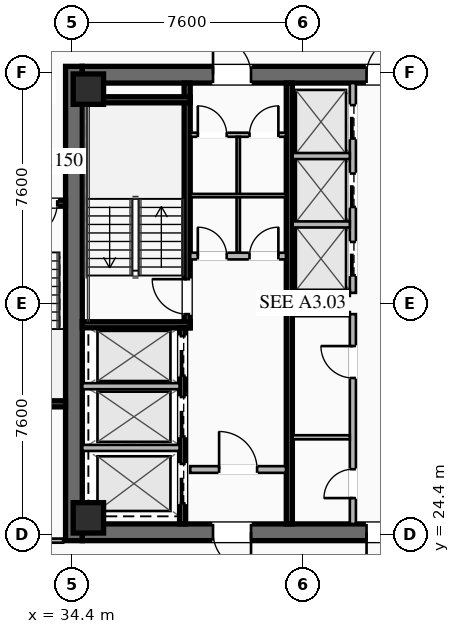
"""IFC4 building model, lengths in metres.
Left out: names, types, materials, properties, quantities, classifications, styles, units other than length and angle.
Written with IfcOpenShell. Run it as: python <this file> out.ifc"""

import sys

from ifc_helpers import new_model, si_unit, direction, frame, frame_2d, origin, origin_2d, place, context, subcontext, project, spatial, rectangle, hollow_rectangle, extrude, element, fill, save


model = new_model("IFC4")
c1 = context("Model", 3, precision=1e-05, world=origin(), true_north=direction((0.0, 1.0)))
c2 = subcontext(c1, "Body", "Model", "MODEL_VIEW")
j1 = project(units=[si_unit("LENGTHUNIT", "METRE"), si_unit("PLANEANGLEUNIT", "RADIAN")], contexts=[c1])
p1 = place(None, origin())
s1 = spatial("IfcSite", under=j1, at=p1, CompositionType="ELEMENT")
p2 = place(p1, origin())
s2 = spatial("IfcBuilding", under=s1, at=p2, CompositionType="ELEMENT")
p3 = place(p2, frame((0.0, 0.0, 146.35)))
s3 = spatial("IfcBuildingStorey", under=s2, at=p3, CompositionType="ELEMENT", Elevation=146.35)
p4 = place(p3, frame((34.475, 24.2, 0.0), z_axis=(0.0, 0.0, 1.0), x_axis=(0.0, 1.0, 0.0)))
e1 = element("IfcWall", 1, at=p4, inside=s3, PredefinedType="SHEAR", context=c2, shape_type="SweptSolid", body=[
    extrude(rectangle(XDim=15.6, YDim=0.55, at=frame_2d((7.8, 0.0))), origin(), (0.0, 0.0, 1.0), 3.55),
])
p5 = place(p3, frame((49.25, 24.475, 0.0), z_axis=(0.0, 0.0, 1.0), x_axis=(-1.0, 0.0, 0.0)))
e2 = element("IfcWall", 2, at=p5, inside=s3, PredefinedType="SHEAR", context=c2, shape_type="SweptSolid", body=[
    extrude(rectangle(XDim=14.5, YDim=0.55, at=frame_2d((7.25, 0.0))), origin(), (0.0, 0.0, 1.0), 3.55),
])
p6 = place(p5, frame((8.95, 0.0, 0.0)))
e3 = element("IfcOpeningElement", 3, at=p6, cuts=e2, PredefinedType="OPENING", context=c2, shape_type="SweptSolid", body=[
    extrude(rectangle(XDim=1.25, YDim=2.25, at=frame_2d((0.625, 1.125))), frame((0.0, 0.285, 0.0), z_axis=(0.0, -1.0, 0.0), x_axis=(1.0, 0.0, 0.0)), (0.0, 0.0, 1.0), 0.57),
])
p7 = place(p5, frame((3.9, 0.0, 0.0)))
e4 = element("IfcOpeningElement", 4, at=p7, cuts=e2, PredefinedType="OPENING", context=c2, shape_type="SweptSolid", body=[
    extrude(rectangle(XDim=1.25, YDim=2.25, at=frame_2d((0.625, 1.125))), frame((0.0, 0.285, 0.0), z_axis=(0.0, -1.0, 0.0), x_axis=(1.0, 0.0, 0.0)), (0.0, 0.0, 1.0), 0.57),
])
p8 = place(p3, frame((34.75, 39.525, 0.0), z_axis=(0.0, 0.0, 1.0), x_axis=(1.0, 0.0, 0.0)))
e5 = element("IfcWall", 5, at=p8, inside=s3, PredefinedType="SHEAR", context=c2, shape_type="SweptSolid", body=[
    extrude(rectangle(XDim=14.5, YDim=0.55, at=frame_2d((7.25, 0.0))), origin(), (0.0, 0.0, 1.0), 3.55),
])
p9 = place(p8, frame((4.3, 0.0, 0.0)))
e6 = element("IfcOpeningElement", 6, at=p9, cuts=e5, PredefinedType="OPENING", context=c2, shape_type="SweptSolid", body=[
    extrude(rectangle(XDim=1.25, YDim=2.25, at=frame_2d((0.625, 1.125))), frame((0.0, 0.285, 0.0), z_axis=(0.0, -1.0, 0.0), x_axis=(1.0, 0.0, 0.0)), (0.0, 0.0, 1.0), 0.57),
])
p10 = place(p8, frame((9.35, 0.0, 0.0)))
e7 = element("IfcOpeningElement", 7, at=p10, cuts=e5, PredefinedType="OPENING", context=c2, shape_type="SweptSolid", body=[
    extrude(rectangle(XDim=1.25, YDim=2.25, at=frame_2d((0.625, 1.125))), frame((0.0, 0.285, 0.0), z_axis=(0.0, -1.0, 0.0), x_axis=(1.0, 0.0, 0.0)), (0.0, 0.0, 1.0), 0.57),
])
for number, where, z_axis, x_axis in (
    (8, (34.95, 24.95, 0.0), (0.0, 0.0, 1.0), (1.0, 0.0, 0.0)),
    (9, (34.95, 39.05, 0.0), (0.0, 0.0, 1.0), (1.0, 0.0, 0.0)),
):
    element("IfcColumn", number, at=place(p3, frame(where, z_axis=z_axis, x_axis=x_axis)), inside=s3, PredefinedType="COLUMN", context=c2, shape_type="SweptSolid", body=[
        extrude(hollow_rectangle(XDim=1.0, YDim=1.0, WallThickness=0.04, at=origin_2d()), origin(), (0.0, 0.0, 1.0), 3.37),
    ])
p11 = place(p3, frame((38.2, 31.2, 0.0), z_axis=(0.0, 0.0, 1.0), x_axis=(0.0, 1.0, 0.0)))
e10 = element("IfcWall", 10, at=p11, inside=s3, PredefinedType="SHEAR", context=c2, shape_type="SweptSolid", body=[
    extrude(rectangle(XDim=8.05, YDim=0.2, at=frame_2d((4.025, 0.0))), origin(), (0.0, 0.0, 1.0), 3.37),
])
p12 = place(p11, frame((0.45, 0.0, 0.0)))
e11 = element("IfcOpeningElement", 11, at=p12, cuts=e10, PredefinedType="OPENING", context=c2, shape_type="SweptSolid", body=[
    extrude(rectangle(XDim=1.15, YDim=2.2, at=frame_2d((0.575, 1.1))), frame((0.0, 0.11, 0.0), z_axis=(0.0, -1.0, 0.0), x_axis=(1.0, 0.0, 0.0)), (0.0, 0.0, 1.0), 0.22),
])
for number, where, z_axis, x_axis in (
    (12, (34.75, 31.3, 0.0), (0.0, 0.0, 1.0), (1.0, 0.0, 0.0)),
    (13, (34.75, 38.7, 0.0), (0.0, 0.0, 1.0), (1.0, 0.0, 0.0)),
):
    element("IfcWall", number, at=place(p3, frame(where, z_axis=z_axis, x_axis=x_axis)), inside=s3, PredefinedType="SHEAR", context=c2, shape_type="SweptSolid", body=[
        extrude(rectangle(XDim=3.55, YDim=0.2, at=frame_2d((1.775, 0.0))), origin(), (0.0, 0.0, 1.0), 3.37),
    ])
p13 = place(p3, frame((41.56, 24.75, 0.0), z_axis=(0.0, 0.0, 1.0), x_axis=(0.0, 1.0, 0.0)))
e14 = element("IfcWall", 14, at=p13, inside=s3, PredefinedType="SHEAR", context=c2, shape_type="SweptSolid", body=[
    extrude(rectangle(XDim=14.5, YDim=0.2, at=frame_2d((7.25, 0.0))), origin(), (0.0, 0.0, 1.0), 3.37),
])
p14 = place(p3, frame((38.3, 33.56, 0.0), z_axis=(0.0, 0.0, 1.0), x_axis=(1.0, 0.0, 0.0)))
e15 = element("IfcWall", 15, at=p14, inside=s3, PredefinedType="SOLIDWALL", context=c2, shape_type="SweptSolid", body=[
    extrude(rectangle(XDim=3.15, YDim=0.22, at=frame_2d((1.575, 0.0))), origin(), (0.0, 0.0, 1.0), 2.723),
])
p15 = place(p14, frame((0.25, 0.0, 0.0)))
e16 = element("IfcOpeningElement", 16, at=p15, cuts=e15, PredefinedType="OPENING", context=c2, shape_type="SweptSolid", body=[
    extrude(rectangle(XDim=0.95, YDim=2.05, at=frame_2d((0.475, 1.025))), frame((0.0, 0.12, 0.0), z_axis=(0.0, -1.0, 0.0), x_axis=(1.0, 0.0, 0.0)), (0.0, 0.0, 1.0), 0.24),
])
p16 = place(p14, frame((1.95, 0.0, 0.0)))
e17 = element("IfcOpeningElement", 17, at=p16, cuts=e15, PredefinedType="OPENING", context=c2, shape_type="SweptSolid", body=[
    extrude(rectangle(XDim=0.95, YDim=2.05, at=frame_2d((0.475, 1.025))), frame((0.0, 0.12, 0.0), z_axis=(0.0, -1.0, 0.0), x_axis=(1.0, 0.0, 0.0)), (0.0, 0.0, 1.0), 0.24),
])
p17 = place(p3, frame((38.3, 26.54, 0.0), z_axis=(0.0, 0.0, 1.0), x_axis=(1.0, 0.0, 0.0)))
e18 = element("IfcWall", 18, at=p17, inside=s3, PredefinedType="SOLIDWALL", context=c2, shape_type="SweptSolid", body=[
    extrude(rectangle(XDim=3.15, YDim=0.22, at=frame_2d((1.575, 0.0))), origin(), (0.0, 0.0, 1.0), 2.723),
])
p18 = place(p17, frame((0.95, 0.0, 0.0)))
e19 = element("IfcOpeningElement", 19, at=p18, cuts=e18, PredefinedType="OPENING", context=c2, shape_type="SweptSolid", body=[
    extrude(rectangle(XDim=1.25, YDim=2.25, at=frame_2d((0.625, 1.125))), frame((0.0, 0.12, 0.0), z_axis=(0.0, -1.0, 0.0), x_axis=(1.0, 0.0, 0.0)), (0.0, 0.0, 1.0), 0.24),
])
p19 = place(p3, frame((38.05, 24.75, 0.0), z_axis=(0.0, 0.0, 1.0), x_axis=(0.0, 1.0, 0.0)))
e20 = element("IfcWall", 20, at=p19, inside=s3, PredefinedType="SHEAR", context=c2, shape_type="SweptSolid", body=[
    extrude(rectangle(XDim=6.45, YDim=0.2, at=frame_2d((3.225, 0.0))), origin(), (0.0, 0.0, 1.0), 3.37),
])
p20 = place(p19, frame((4.875, 0.0, 0.0)))
e21 = element("IfcOpeningElement", 21, at=p20, cuts=e20, PredefinedType="OPENING", context=c2, shape_type="SweptSolid", body=[
    extrude(rectangle(XDim=1.3, YDim=2.25, at=frame_2d((0.65, 1.125))), frame((0.0, 0.11, 0.0), z_axis=(0.0, -1.0, 0.0), x_axis=(1.0, 0.0, 0.0)), (0.0, 0.0, 1.0), 0.22),
])
p21 = place(p19, frame((2.875, 0.0, 0.0)))
e22 = element("IfcOpeningElement", 22, at=p21, cuts=e20, PredefinedType="OPENING", context=c2, shape_type="SweptSolid", body=[
    extrude(rectangle(XDim=1.3, YDim=2.25, at=frame_2d((0.65, 1.125))), frame((0.0, 0.11, 0.0), z_axis=(0.0, -1.0, 0.0), x_axis=(1.0, 0.0, 0.0)), (0.0, 0.0, 1.0), 0.22),
])
p22 = place(p19, frame((0.675, 0.0, 0.0)))
e23 = element("IfcOpeningElement", 23, at=p22, cuts=e20, PredefinedType="OPENING", context=c2, shape_type="SweptSolid", body=[
    extrude(rectangle(XDim=1.3, YDim=2.25, at=frame_2d((0.65, 1.125))), frame((0.0, 0.11, 0.0), z_axis=(0.0, -1.0, 0.0), x_axis=(1.0, 0.0, 0.0)), (0.0, 0.0, 1.0), 0.22),
])
for number, where, z_axis, x_axis in (
    (24, (34.75, 27.25, 0.0), (0.0, 0.0, 1.0), (1.0, 0.0, 0.0)),
    (25, (34.75, 29.28, 0.0), (0.0, 0.0, 1.0), (1.0, 0.0, 0.0)),
):
    element("IfcWall", number, at=place(p3, frame(where, z_axis=z_axis, x_axis=x_axis)), inside=s3, PredefinedType="SOLIDWALL", context=c2, shape_type="SweptSolid", body=[
        extrude(rectangle(XDim=3.2, YDim=0.2, at=frame_2d((1.6, 0.0))), origin(), (0.0, 0.0, 1.0), 3.37),
    ])
p23 = place(p3, frame((38.3, 37.55, 0.0), z_axis=(0.0, 0.0, 1.0), x_axis=(1.0, 0.0, 0.0)))
e26 = element("IfcWall", 26, at=p23, inside=s3, PredefinedType="PARTITIONING", context=c2, shape_type="SweptSolid", body=[
    extrude(rectangle(XDim=3.15, YDim=0.135, at=frame_2d((1.575, 0.0))), origin(), (0.0, 0.0, 1.0), 2.723),
])
p24 = place(p23, frame((0.25, 0.0, 0.0)))
e27 = element("IfcOpeningElement", 27, at=p24, cuts=e26, PredefinedType="OPENING", context=c2, shape_type="SweptSolid", body=[
    extrude(rectangle(XDim=0.95, YDim=2.05, at=frame_2d((0.475, 1.025))), frame((0.0, 0.077, 0.0), z_axis=(0.0, -1.0, 0.0), x_axis=(1.0, 0.0, 0.0)), (0.0, 0.0, 1.0), 0.155),
])
p25 = place(p23, frame((1.95, 0.0, 0.0)))
e28 = element("IfcOpeningElement", 28, at=p25, cuts=e26, PredefinedType="OPENING", context=c2, shape_type="SweptSolid", body=[
    extrude(rectangle(XDim=0.95, YDim=2.05, at=frame_2d((0.475, 1.025))), frame((0.0, 0.077, 0.0), z_axis=(0.0, -1.0, 0.0), x_axis=(1.0, 0.0, 0.0)), (0.0, 0.0, 1.0), 0.155),
])
p26 = place(p3, frame((39.88, 33.68, 0.0), z_axis=(0.0, 0.0, 1.0), x_axis=(0.0, 1.0, 0.0)))
e29 = element("IfcWall", 29, at=p26, inside=s3, PredefinedType="PARTITIONING", context=c2, shape_type="SweptSolid", body=[
    extrude(rectangle(XDim=3.8, YDim=0.11, at=frame_2d((1.9, 0.0))), origin(), (0.0, 0.0, 1.0), 2.723),
])
p27 = place(p3, frame((38.3, 35.55, 0.0), z_axis=(0.0, 0.0, 1.0), x_axis=(1.0, 0.0, 0.0)))
e30 = element("IfcWall", 30, at=p27, inside=s3, PredefinedType="PARTITIONING", context=c2, shape_type="SweptSolid", body=[
    extrude(rectangle(XDim=3.15, YDim=0.11, at=frame_2d((1.575, 0.0))), origin(), (0.0, 0.0, 1.0), 2.723),
])
p28 = place(p3, frame((43.65, 24.75, 0.0), z_axis=(0.0, 0.0, 1.0), x_axis=(0.0, 1.0, 0.0)))
e31 = element("IfcWall", 31, at=p28, inside=s3, PredefinedType="SOLIDWALL", context=c2, shape_type="SweptSolid", body=[
    extrude(rectangle(XDim=6.9, YDim=0.2, at=frame_2d((3.45, 0.0))), origin(), (0.0, 0.0, 1.0), 2.723),
])
p29 = place(p28, frame((0.85, 0.0, 0.0)))
e32 = element("IfcOpeningElement", 32, at=p29, cuts=e31, PredefinedType="OPENING", context=c2, shape_type="SweptSolid", body=[
    extrude(rectangle(XDim=0.95, YDim=2.05, at=frame_2d((0.475, 1.025))), frame((0.0, 0.11, 0.0), z_axis=(0.0, -1.0, 0.0), x_axis=(1.0, 0.0, 0.0)), (0.0, 0.0, 1.0), 0.22),
])
p30 = place(p28, frame((4.8, 0.0, 0.0)))
e33 = element("IfcOpeningElement", 33, at=p30, cuts=e31, PredefinedType="OPENING", context=c2, shape_type="SweptSolid", body=[
    extrude(rectangle(XDim=1.05, YDim=2.2, at=frame_2d((0.525, 1.1))), frame((0.0, 0.11, 0.0), z_axis=(0.0, -1.0, 0.0), x_axis=(1.0, 0.0, 0.0)), (0.0, 0.0, 1.0), 0.22),
])
for number, where, z_axis, x_axis in (
    (34, (41.67, 31.65, 0.0), (0.0, 0.0, 1.0), (1.0, 0.0, 0.0)),
    (35, (41.67, 27.6, 0.0), (0.0, 0.0, 1.0), (1.0, 0.0, 0.0)),
):
    element("IfcWall", number, at=place(p3, frame(where, z_axis=z_axis, x_axis=x_axis)), inside=s3, PredefinedType="PARTITIONING", context=c2, shape_type="SweptSolid", body=[
        extrude(rectangle(XDim=1.88, YDim=0.135, at=frame_2d((0.94, 0.0))), origin(), (0.0, 0.0, 1.0), 2.723),
    ])
p31 = place(p3, frame((43.65, 32.35, 0.0), z_axis=(0.0, 0.0, 1.0), x_axis=(0.0, 1.0, 0.0)))
e36 = element("IfcWall", 36, at=p31, inside=s3, PredefinedType="SOLIDWALL", context=c2, shape_type="SweptSolid", body=[
    extrude(rectangle(XDim=6.9, YDim=0.2, at=frame_2d((3.45, 0.0))), origin(), (0.0, 0.0, 1.0), 3.37),
])
p32 = place(p31, frame((0.575, 0.0, 0.0)))
e37 = element("IfcOpeningElement", 37, at=p32, cuts=e36, PredefinedType="OPENING", context=c2, shape_type="SweptSolid", body=[
    extrude(rectangle(XDim=1.1, YDim=2.2, at=frame_2d((0.55, 1.1))), frame((0.0, 0.11, 0.0), z_axis=(0.0, -1.0, 0.0), x_axis=(1.0, 0.0, 0.0)), (0.0, 0.0, 1.0), 0.22),
])
p33 = place(p31, frame((2.825, 0.0, 0.0)))
e38 = element("IfcOpeningElement", 38, at=p33, cuts=e36, PredefinedType="OPENING", context=c2, shape_type="SweptSolid", body=[
    extrude(rectangle(XDim=1.1, YDim=2.2, at=frame_2d((0.55, 1.1))), frame((0.0, 0.11, 0.0), z_axis=(0.0, -1.0, 0.0), x_axis=(1.0, 0.0, 0.0)), (0.0, 0.0, 1.0), 0.22),
])
p34 = place(p31, frame((5.075, 0.0, 0.0)))
e39 = element("IfcOpeningElement", 39, at=p34, cuts=e36, PredefinedType="OPENING", context=c2, shape_type="SweptSolid", body=[
    extrude(rectangle(XDim=1.1, YDim=2.2, at=frame_2d((0.55, 1.1))), frame((0.0, 0.11, 0.0), z_axis=(0.0, -1.0, 0.0), x_axis=(1.0, 0.0, 0.0)), (0.0, 0.0, 1.0), 0.22),
])
for number, where, z_axis, x_axis in (
    (40, (41.67, 32.35, 0.0), (0.0, 0.0, 1.0), (1.0, 0.0, 0.0)),
    (41, (41.67, 34.6, 0.0), (0.0, 0.0, 1.0), (1.0, 0.0, 0.0)),
    (42, (41.67, 36.85, 0.0), (0.0, 0.0, 1.0), (1.0, 0.0, 0.0)),
):
    element("IfcWall", number, at=place(p3, frame(where, z_axis=z_axis, x_axis=x_axis)), inside=s3, PredefinedType="SOLIDWALL", context=c2, shape_type="SweptSolid", body=[
        extrude(rectangle(XDim=1.88, YDim=0.2, at=frame_2d((0.94, 0.0))), origin(), (0.0, 0.0, 1.0), 3.37),
    ])
p35 = place(p3, frame((34.2, 35.3, 0.0), z_axis=(0.0, 0.0, 1.0), x_axis=(-1.0, 0.0, 0.0)))
e43 = element("IfcWall", 43, at=p35, inside=s3, PredefinedType="SHEAR", context=c2, shape_type="SweptSolid", body=[
    extrude(rectangle(XDim=3.4, YDim=0.2, at=frame_2d((1.7, 0.0))), origin(), (0.0, 0.0, 1.0), 3.37),
])
p36 = place(p35, frame((0.275, 0.0, 0.0)))
e44 = element("IfcOpeningElement", 44, at=p36, cuts=e43, PredefinedType="OPENING", context=c2, shape_type="SweptSolid", body=[
    extrude(rectangle(XDim=1.15, YDim=2.2, at=frame_2d((0.575, 1.1))), frame((0.0, 0.11, 0.0), z_axis=(0.0, -1.0, 0.0), x_axis=(1.0, 0.0, 0.0)), (0.0, 0.0, 1.0), 0.22),
])
p37 = place(p3, frame((30.8, 28.7, 0.0), z_axis=(0.0, 0.0, 1.0), x_axis=(1.0, 0.0, 0.0)))
e45 = element("IfcWall", 45, at=p37, inside=s3, PredefinedType="SHEAR", context=c2, shape_type="SweptSolid", body=[
    extrude(rectangle(XDim=3.4, YDim=0.2, at=frame_2d((1.7, 0.0))), origin(), (0.0, 0.0, 1.0), 3.37),
])
p38 = place(p3, frame((22.72, 24.2, 0.0), z_axis=(0.0, 0.0, 1.0), x_axis=(1.0, 0.0, 0.0)))
e46 = element("IfcWall", 46, at=p38, inside=s3, PredefinedType="PARTITIONING", context=c2, shape_type="SweptSolid", body=[
    extrude(rectangle(XDim=11.4, YDim=0.135, at=frame_2d((5.7, 0.0))), origin(), (0.0, 0.0, 1.0), 2.723),
])
p39 = place(p38, frame((8.405, 0.0, 0.0)))
e47 = element("IfcOpeningElement", 47, at=p39, cuts=e46, PredefinedType="OPENING", context=c2, shape_type="SweptSolid", body=[
    extrude(rectangle(XDim=0.95, YDim=2.05, at=frame_2d((0.475, 1.025))), frame((0.0, 0.077, 0.0), z_axis=(0.0, -1.0, 0.0), x_axis=(1.0, 0.0, 0.0)), (0.0, 0.0, 1.0), 0.155),
])
p40 = place(p9, origin())
e48 = element("IfcDoor", 48, at=p40, inside=s3, OperationType="SINGLE_SWING_LEFT", PredefinedType="DOOR", context=c2, shape_type="SweptSolid", body=[
    extrude(rectangle(XDim=1.25, YDim=2.25, at=frame_2d((0.625, 1.125))), frame((0.0, 0.025, 0.0), z_axis=(0.0, -1.0, 0.0), x_axis=(1.0, 0.0, 0.0)), (0.0, 0.0, 1.0), 0.05),
])
fill(e6, e48)
p41 = place(p10, origin())
e49 = element("IfcDoor", 49, at=p41, inside=s3, OperationType="SINGLE_SWING_RIGHT", PredefinedType="DOOR", context=c2, shape_type="SweptSolid", body=[
    extrude(rectangle(XDim=1.25, YDim=2.25, at=frame_2d((0.625, 1.125))), frame((0.0, 0.025, 0.0), z_axis=(0.0, -1.0, 0.0), x_axis=(1.0, 0.0, 0.0)), (0.0, 0.0, 1.0), 0.05),
])
fill(e7, e49)
p42 = place(p6, origin())
e50 = element("IfcDoor", 50, at=p42, inside=s3, OperationType="SINGLE_SWING_LEFT", PredefinedType="DOOR", context=c2, shape_type="SweptSolid", body=[
    extrude(rectangle(XDim=1.25, YDim=2.25, at=frame_2d((0.625, 1.125))), frame((0.0, 0.025, 0.0), z_axis=(0.0, -1.0, 0.0), x_axis=(1.0, 0.0, 0.0)), (0.0, 0.0, 1.0), 0.05),
])
fill(e3, e50)
p43 = place(p7, origin())
e51 = element("IfcDoor", 51, at=p43, inside=s3, OperationType="SINGLE_SWING_RIGHT", PredefinedType="DOOR", context=c2, shape_type="SweptSolid", body=[
    extrude(rectangle(XDim=1.25, YDim=2.25, at=frame_2d((0.625, 1.125))), frame((0.0, 0.025, 0.0), z_axis=(0.0, -1.0, 0.0), x_axis=(1.0, 0.0, 0.0)), (0.0, 0.0, 1.0), 0.05),
])
fill(e4, e51)
p44 = place(p12, origin())
e52 = element("IfcDoor", 52, at=p44, inside=s3, OperationType="SINGLE_SWING_RIGHT", PredefinedType="DOOR", context=c2, shape_type="SweptSolid", body=[
    extrude(rectangle(XDim=1.15, YDim=2.2, at=frame_2d((0.575, 1.1))), frame((0.0, 0.025, 0.0), z_axis=(0.0, -1.0, 0.0), x_axis=(1.0, 0.0, 0.0)), (0.0, 0.0, 1.0), 0.05),
])
fill(e11, e52)
p45 = place(p18, origin())
e53 = element("IfcDoor", 53, at=p45, inside=s3, OperationType="SINGLE_SWING_LEFT", PredefinedType="DOOR", context=c2, shape_type="SweptSolid", body=[
    extrude(rectangle(XDim=1.25, YDim=2.25, at=frame_2d((0.625, 1.125))), frame((0.0, 0.025, 0.0), z_axis=(0.0, -1.0, 0.0), x_axis=(1.0, 0.0, 0.0)), (0.0, 0.0, 1.0), 0.05),
])
fill(e19, e53)
p46 = place(p24, origin())
e54 = element("IfcDoor", 54, at=p46, inside=s3, OperationType="SINGLE_SWING_LEFT", PredefinedType="DOOR", context=c2, shape_type="SweptSolid", body=[
    extrude(rectangle(XDim=0.95, YDim=2.05, at=frame_2d((0.475, 1.025))), frame((0.0, 0.025, 0.0), z_axis=(0.0, -1.0, 0.0), x_axis=(1.0, 0.0, 0.0)), (0.0, 0.0, 1.0), 0.05),
])
fill(e27, e54)
p47 = place(p25, origin())
e55 = element("IfcDoor", 55, at=p47, inside=s3, OperationType="SINGLE_SWING_RIGHT", PredefinedType="DOOR", context=c2, shape_type="SweptSolid", body=[
    extrude(rectangle(XDim=0.95, YDim=2.05, at=frame_2d((0.475, 1.025))), frame((0.0, 0.025, 0.0), z_axis=(0.0, -1.0, 0.0), x_axis=(1.0, 0.0, 0.0)), (0.0, 0.0, 1.0), 0.05),
])
fill(e28, e55)
p48 = place(p15, origin())
e56 = element("IfcDoor", 56, at=p48, inside=s3, OperationType="SINGLE_SWING_LEFT", PredefinedType="DOOR", context=c2, shape_type="SweptSolid", body=[
    extrude(rectangle(XDim=0.95, YDim=2.05, at=frame_2d((0.475, 1.025))), frame((0.0, 0.025, 0.0), z_axis=(0.0, -1.0, 0.0), x_axis=(1.0, 0.0, 0.0)), (0.0, 0.0, 1.0), 0.05),
])
fill(e16, e56)
p49 = place(p16, origin())
e57 = element("IfcDoor", 57, at=p49, inside=s3, OperationType="SINGLE_SWING_RIGHT", PredefinedType="DOOR", context=c2, shape_type="SweptSolid", body=[
    extrude(rectangle(XDim=0.95, YDim=2.05, at=frame_2d((0.475, 1.025))), frame((0.0, 0.025, 0.0), z_axis=(0.0, -1.0, 0.0), x_axis=(1.0, 0.0, 0.0)), (0.0, 0.0, 1.0), 0.05),
])
fill(e17, e57)
p50 = place(p29, origin())
e58 = element("IfcDoor", 58, at=p50, inside=s3, OperationType="SINGLE_SWING_LEFT", PredefinedType="DOOR", context=c2, shape_type="SweptSolid", body=[
    extrude(rectangle(XDim=0.95, YDim=2.05, at=frame_2d((0.475, 1.025))), frame((0.0, 0.025, 0.0), z_axis=(0.0, -1.0, 0.0), x_axis=(1.0, 0.0, 0.0)), (0.0, 0.0, 1.0), 0.05),
])
fill(e32, e58)
p51 = place(p30, origin())
e59 = element("IfcDoor", 59, at=p51, inside=s3, OperationType="SINGLE_SWING_RIGHT", PredefinedType="DOOR", context=c2, shape_type="SweptSolid", body=[
    extrude(rectangle(XDim=1.05, YDim=2.2, at=frame_2d((0.525, 1.1))), frame((0.0, 0.025, 0.0), z_axis=(0.0, -1.0, 0.0), x_axis=(1.0, 0.0, 0.0)), (0.0, 0.0, 1.0), 0.05),
])
fill(e33, e59)
p52 = place(p36, origin())
e60 = element("IfcDoor", 60, at=p52, inside=s3, OperationType="SINGLE_SWING_RIGHT", PredefinedType="DOOR", context=c2, shape_type="SweptSolid", body=[
    extrude(rectangle(XDim=1.15, YDim=2.2, at=frame_2d((0.575, 1.1))), frame((0.0, 0.025, 0.0), z_axis=(0.0, -1.0, 0.0), x_axis=(1.0, 0.0, 0.0)), (0.0, 0.0, 1.0), 0.05),
])
fill(e44, e60)
p53 = place(p20, origin())
e61 = element("IfcDoor", 61, at=p53, inside=s3, OperationType="SLIDING_TO_LEFT", PredefinedType="DOOR", context=c2, shape_type="SweptSolid", body=[
    extrude(rectangle(XDim=1.3, YDim=2.25, at=frame_2d((0.65, 1.125))), frame((0.0, 0.025, 0.0), z_axis=(0.0, -1.0, 0.0), x_axis=(1.0, 0.0, 0.0)), (0.0, 0.0, 1.0), 0.05),
])
fill(e21, e61)
p54 = place(p21, origin())
e62 = element("IfcDoor", 62, at=p54, inside=s3, OperationType="SLIDING_TO_LEFT", PredefinedType="DOOR", context=c2, shape_type="SweptSolid", body=[
    extrude(rectangle(XDim=1.3, YDim=2.25, at=frame_2d((0.65, 1.125))), frame((0.0, 0.025, 0.0), z_axis=(0.0, -1.0, 0.0), x_axis=(1.0, 0.0, 0.0)), (0.0, 0.0, 1.0), 0.05),
])
fill(e22, e62)
p55 = place(p22, origin())
e63 = element("IfcDoor", 63, at=p55, inside=s3, OperationType="SLIDING_TO_LEFT", PredefinedType="DOOR", context=c2, shape_type="SweptSolid", body=[
    extrude(rectangle(XDim=1.3, YDim=2.25, at=frame_2d((0.65, 1.125))), frame((0.0, 0.025, 0.0), z_axis=(0.0, -1.0, 0.0), x_axis=(1.0, 0.0, 0.0)), (0.0, 0.0, 1.0), 0.05),
])
fill(e23, e63)
p56 = place(p32, origin())
e64 = element("IfcDoor", 64, at=p56, inside=s3, OperationType="SLIDING_TO_LEFT", PredefinedType="DOOR", context=c2, shape_type="SweptSolid", body=[
    extrude(rectangle(XDim=1.1, YDim=2.2, at=frame_2d((0.55, 1.1))), frame((0.0, 0.025, 0.0), z_axis=(0.0, -1.0, 0.0), x_axis=(1.0, 0.0, 0.0)), (0.0, 0.0, 1.0), 0.05),
])
fill(e37, e64)
p57 = place(p33, origin())
e65 = element("IfcDoor", 65, at=p57, inside=s3, OperationType="SLIDING_TO_LEFT", PredefinedType="DOOR", context=c2, shape_type="SweptSolid", body=[
    extrude(rectangle(XDim=1.1, YDim=2.2, at=frame_2d((0.55, 1.1))), frame((0.0, 0.025, 0.0), z_axis=(0.0, -1.0, 0.0), x_axis=(1.0, 0.0, 0.0)), (0.0, 0.0, 1.0), 0.05),
])
fill(e38, e65)
p58 = place(p34, origin())
e66 = element("IfcDoor", 66, at=p58, inside=s3, OperationType="SLIDING_TO_LEFT", PredefinedType="DOOR", context=c2, shape_type="SweptSolid", body=[
    extrude(rectangle(XDim=1.1, YDim=2.2, at=frame_2d((0.55, 1.1))), frame((0.0, 0.025, 0.0), z_axis=(0.0, -1.0, 0.0), x_axis=(1.0, 0.0, 0.0)), (0.0, 0.0, 1.0), 0.05),
])
fill(e39, e66)
save(model, sys.argv[1])
